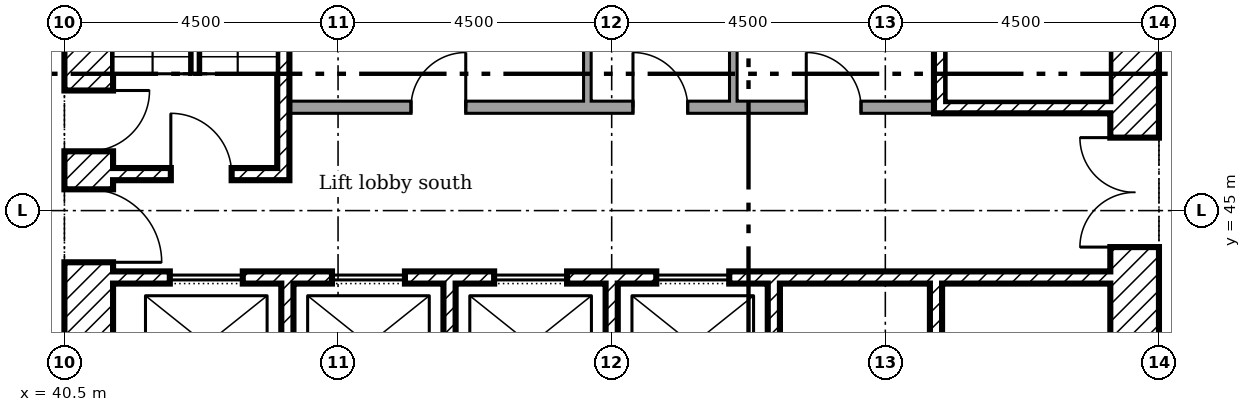
"""IFC4 building model, lengths in metres.
Left out: names, types, materials, properties, quantities, classifications, styles, units other than length and angle.
Written with IfcOpenShell. Run it as: python <this file> out.ifc"""

import sys

from ifc_helpers import new_model, si_unit, direction, frame, frame_2d, origin, place, context, subcontext, project, spatial, rectangle, extrude, element, fill, save


model = new_model("IFC4")
c1 = context("Model", 3, precision=1e-05, world=origin(), true_north=direction((0.0, 1.0)))
c2 = subcontext(c1, "Body", "Model", "MODEL_VIEW")
j1 = project(units=[si_unit("LENGTHUNIT", "METRE"), si_unit("PLANEANGLEUNIT", "RADIAN")], contexts=[c1])
p1 = place(None, origin())
s1 = spatial("IfcSite", under=j1, at=p1, CompositionType="ELEMENT")
p2 = place(p1, origin())
s2 = spatial("IfcBuilding", under=s1, at=p2, CompositionType="ELEMENT")
p3 = place(p2, frame((0.0, 0.0, 58.2)))
s3 = spatial("IfcBuildingStorey", under=s2, at=p3, CompositionType="ELEMENT", Elevation=58.2)
p4 = place(p3, frame((58.1, 40.5, 0.0), z_axis=(0.0, 0.0, 1.0), x_axis=(0.0, 1.0, 0.0)))
e1 = element("IfcWall", 1, at=p4, inside=s3, PredefinedType="SHEAR", context=c2, shape_type="SweptSolid", body=[
    extrude(rectangle(XDim=18.0, YDim=0.8, at=frame_2d((9.0, 0.0))), origin(), (0.0, 0.0, 1.0), 3.35),
])
p5 = place(p4, frame((13.15, 0.0, 0.0)))
e2 = element("IfcOpeningElement", 2, at=p5, cuts=e1, PredefinedType="OPENING", context=c2, shape_type="SweptSolid", body=[
    extrude(rectangle(XDim=1.2, YDim=2.1, at=frame_2d((0.6, 1.05))), frame((0.0, 0.41, 0.0), z_axis=(0.0, -1.0, 0.0), x_axis=(1.0, 0.0, 0.0)), (0.0, 0.0, 1.0), 0.82),
])
p6 = place(p4, frame((3.9, 0.0, 0.0)))
e3 = element("IfcOpeningElement", 3, at=p6, cuts=e1, PredefinedType="OPENING", context=c2, shape_type="SweptSolid", body=[
    extrude(rectangle(XDim=1.8, YDim=2.1, at=frame_2d((0.9, 1.05))), frame((0.0, 0.41, 0.0), z_axis=(0.0, -1.0, 0.0), x_axis=(1.0, 0.0, 0.0)), (0.0, 0.0, 1.0), 0.82),
])
p7 = place(p4, frame((11.525, 0.0, 0.0)))
e4 = element("IfcOpeningElement", 4, at=p7, cuts=e1, PredefinedType="OPENING", context=c2, shape_type="SweptSolid", body=[
    extrude(rectangle(XDim=1.0, YDim=2.1, at=frame_2d((0.5, 1.05))), frame((0.0, 0.41, 0.0), z_axis=(0.0, -1.0, 0.0), x_axis=(1.0, 0.0, 0.0)), (0.0, 0.0, 1.0), 0.82),
])
p8 = place(p3, frame((40.9, 40.5, 0.0), z_axis=(0.0, 0.0, 1.0), x_axis=(0.0, 1.0, 0.0)))
e5 = element("IfcWall", 5, at=p8, inside=s3, PredefinedType="SHEAR", context=c2, shape_type="SweptSolid", body=[
    extrude(rectangle(XDim=18.0, YDim=0.8, at=frame_2d((9.0, 0.0))), origin(), (0.0, 0.0, 1.0), 3.35),
])
p9 = place(p8, frame((3.65, 0.0, 0.0)))
e6 = element("IfcOpeningElement", 6, at=p9, cuts=e5, PredefinedType="OPENING", context=c2, shape_type="SweptSolid", body=[
    extrude(rectangle(XDim=1.2, YDim=2.1, at=frame_2d((0.6, 1.05))), frame((0.0, 0.41, 0.0), z_axis=(0.0, -1.0, 0.0), x_axis=(1.0, 0.0, 0.0)), (0.0, 0.0, 1.0), 0.82),
])
p10 = place(p8, frame((5.475, 0.0, 0.0)))
e7 = element("IfcOpeningElement", 7, at=p10, cuts=e5, PredefinedType="OPENING", context=c2, shape_type="SweptSolid", body=[
    extrude(rectangle(XDim=1.0, YDim=2.1, at=frame_2d((0.5, 1.05))), frame((0.0, 0.41, 0.0), z_axis=(0.0, -1.0, 0.0), x_axis=(1.0, 0.0, 0.0)), (0.0, 0.0, 1.0), 0.82),
])
p11 = place(p8, frame((12.3, 0.0, 0.0)))
e8 = element("IfcOpeningElement", 8, at=p11, cuts=e5, PredefinedType="OPENING", context=c2, shape_type="SweptSolid", body=[
    extrude(rectangle(XDim=1.0, YDim=2.1, at=frame_2d((0.5, 1.05))), frame((0.0, 0.41, 0.0), z_axis=(0.0, -1.0, 0.0), x_axis=(1.0, 0.0, 0.0)), (0.0, 0.0, 1.0), 0.82),
])
for number, where, z_axis, x_axis in (
    (9, (44.167, 41.3, 0.0), (0.0, 0.0, 1.0), (0.0, 1.0, 0.0)),
    (10, (46.833, 41.3, 0.0), (0.0, 0.0, 1.0), (0.0, 1.0, 0.0)),
    (11, (49.5, 41.3, 0.0), (0.0, 0.0, 1.0), (0.0, 1.0, 0.0)),
    (12, (52.167, 41.3, 0.0), (0.0, 0.0, 1.0), (0.0, 1.0, 0.0)),
    (13, (54.833, 41.3, 0.0), (0.0, 0.0, 1.0), (0.0, 1.0, 0.0)),
):
    element("IfcWall", number, at=place(p3, frame(where, z_axis=z_axis, x_axis=x_axis)), inside=s3, PredefinedType="SHEAR", context=c2, shape_type="SweptSolid", body=[
        extrude(rectangle(XDim=2.5, YDim=0.2, at=frame_2d((1.25, 0.0))), origin(), (0.0, 0.0, 1.0), 3.35),
    ])
p12 = place(p3, frame((41.3, 43.9, 0.0)))
e14 = element("IfcWall", 14, at=p12, inside=s3, PredefinedType="SHEAR", context=c2, shape_type="SweptSolid", body=[
    extrude(rectangle(XDim=16.4, YDim=0.2, at=frame_2d((8.2, 0.0))), origin(), (0.0, 0.0, 1.0), 3.35),
])
p13 = place(p12, frame((0.933, 0.0, 0.0)))
e15 = element("IfcOpeningElement", 15, at=p13, cuts=e14, PredefinedType="OPENING", context=c2, shape_type="SweptSolid", body=[
    extrude(rectangle(XDim=1.2, YDim=2.1, at=frame_2d((0.6, 1.05))), frame((0.0, 0.11, 0.0), z_axis=(0.0, -1.0, 0.0), x_axis=(1.0, 0.0, 0.0)), (0.0, 0.0, 1.0), 0.22),
])
p14 = place(p12, frame((3.6, 0.0, 0.0)))
e16 = element("IfcOpeningElement", 16, at=p14, cuts=e14, PredefinedType="OPENING", context=c2, shape_type="SweptSolid", body=[
    extrude(rectangle(XDim=1.2, YDim=2.1, at=frame_2d((0.6, 1.05))), frame((0.0, 0.11, 0.0), z_axis=(0.0, -1.0, 0.0), x_axis=(1.0, 0.0, 0.0)), (0.0, 0.0, 1.0), 0.22),
])
p15 = place(p12, frame((6.267, 0.0, 0.0)))
e17 = element("IfcOpeningElement", 17, at=p15, cuts=e14, PredefinedType="OPENING", context=c2, shape_type="SweptSolid", body=[
    extrude(rectangle(XDim=1.2, YDim=2.1, at=frame_2d((0.6, 1.05))), frame((0.0, 0.11, 0.0), z_axis=(0.0, -1.0, 0.0), x_axis=(1.0, 0.0, 0.0)), (0.0, 0.0, 1.0), 0.22),
])
p16 = place(p12, frame((8.933, 0.0, 0.0)))
e18 = element("IfcOpeningElement", 18, at=p16, cuts=e14, PredefinedType="OPENING", context=c2, shape_type="SweptSolid", body=[
    extrude(rectangle(XDim=1.2, YDim=2.1, at=frame_2d((0.6, 1.05))), frame((0.0, 0.11, 0.0), z_axis=(0.0, -1.0, 0.0), x_axis=(1.0, 0.0, 0.0)), (0.0, 0.0, 1.0), 0.22),
])
p17 = place(p3, frame((44.1, 45.5, 0.0), z_axis=(0.0, 0.0, 1.0), x_axis=(0.0, 1.0, 0.0)))
e19 = element("IfcWall", 19, at=p17, inside=s3, PredefinedType="SHEAR", context=c2, shape_type="SweptSolid", body=[
    extrude(rectangle(XDim=6.9, YDim=0.2, at=frame_2d((3.45, 0.0))), origin(), (0.0, 0.0, 1.0), 3.35),
])
p18 = place(p3, frame((41.3, 45.6, 0.0)))
e20 = element("IfcWall", 20, at=p18, inside=s3, PredefinedType="SHEAR", context=c2, shape_type="SweptSolid", body=[
    extrude(rectangle(XDim=2.7, YDim=0.2, at=frame_2d((1.35, 0.0))), origin(), (0.0, 0.0, 1.0), 3.35),
])
p19 = place(p18, frame((0.95, 0.0, 0.0)))
e21 = element("IfcOpeningElement", 21, at=p19, cuts=e20, PredefinedType="OPENING", context=c2, shape_type="SweptSolid", body=[
    extrude(rectangle(XDim=1.0, YDim=2.1, at=frame_2d((0.5, 1.05))), frame((0.0, 0.11, 0.0), z_axis=(0.0, -1.0, 0.0), x_axis=(1.0, 0.0, 0.0)), (0.0, 0.0, 1.0), 0.22),
])
p20 = place(p3, frame((54.8, 46.7, 0.0)))
e22 = element("IfcWall", 22, at=p20, inside=s3, PredefinedType="SHEAR", context=c2, shape_type="SweptSolid", body=[
    extrude(rectangle(XDim=2.9, YDim=0.2, at=frame_2d((1.45, 0.0))), origin(), (0.0, 0.0, 1.0), 3.35),
])
p21 = place(p3, frame((54.9, 46.8, 0.0), z_axis=(0.0, 0.0, 1.0), x_axis=(0.0, 1.0, 0.0)))
e23 = element("IfcWall", 23, at=p21, inside=s3, PredefinedType="SHEAR", context=c2, shape_type="SweptSolid", body=[
    extrude(rectangle(XDim=6.5, YDim=0.2, at=frame_2d((3.25, 0.0))), origin(), (0.0, 0.0, 1.0), 3.35),
])
p22 = place(p3, frame((44.2, 46.7, 0.0)))
e24 = element("IfcWall", 24, at=p22, inside=s3, PredefinedType="PARTITIONING", context=c2, shape_type="SweptSolid", body=[
    extrude(rectangle(XDim=10.6, YDim=0.2, at=frame_2d((5.3, 0.0))), origin(), (0.0, 0.0, 1.0), 3.35),
])
p23 = place(p22, frame((2.0, 0.0, 0.0)))
e25 = element("IfcOpeningElement", 25, at=p23, cuts=e24, PredefinedType="OPENING", context=c2, shape_type="SweptSolid", body=[
    extrude(rectangle(XDim=0.9, YDim=2.1, at=frame_2d((0.45, 1.05))), frame((0.0, 0.11, 0.0), z_axis=(0.0, -1.0, 0.0), x_axis=(1.0, 0.0, 0.0)), (0.0, 0.0, 1.0), 0.22),
])
p24 = place(p22, frame((5.65, 0.0, 0.0)))
e26 = element("IfcOpeningElement", 26, at=p24, cuts=e24, PredefinedType="OPENING", context=c2, shape_type="SweptSolid", body=[
    extrude(rectangle(XDim=0.9, YDim=2.1, at=frame_2d((0.45, 1.05))), frame((0.0, 0.11, 0.0), z_axis=(0.0, -1.0, 0.0), x_axis=(1.0, 0.0, 0.0)), (0.0, 0.0, 1.0), 0.22),
])
p25 = place(p22, frame((8.5, 0.0, 0.0)))
e27 = element("IfcOpeningElement", 27, at=p25, cuts=e24, PredefinedType="OPENING", context=c2, shape_type="SweptSolid", body=[
    extrude(rectangle(XDim=0.9, YDim=2.1, at=frame_2d((0.45, 1.05))), frame((0.0, 0.11, 0.0), z_axis=(0.0, -1.0, 0.0), x_axis=(1.0, 0.0, 0.0)), (0.0, 0.0, 1.0), 0.22),
])
p26 = place(p3, frame((49.1, 46.8, 0.0), z_axis=(0.0, 0.0, 1.0), x_axis=(0.0, 1.0, 0.0)))
e28 = element("IfcWall", 28, at=p26, inside=s3, PredefinedType="PARTITIONING", context=c2, shape_type="SweptSolid", body=[
    extrude(rectangle(XDim=5.0, YDim=0.125, at=frame_2d((2.5, 0.0))), origin(), (0.0, 0.0, 1.0), 3.35),
])
p27 = place(p3, frame((51.5, 46.8, 0.0), z_axis=(0.0, 0.0, 1.0), x_axis=(0.0, 1.0, 0.0)))
e29 = element("IfcWall", 29, at=p27, inside=s3, PredefinedType="PARTITIONING", context=c2, shape_type="SweptSolid", body=[
    extrude(rectangle(XDim=2.762, YDim=0.125, at=frame_2d((1.381, 0.0))), origin(), (0.0, 0.0, 1.0), 3.35),
])
p28 = place(p6, origin())
e30 = element("IfcDoor", 30, at=p28, inside=s3, OperationType="DOUBLE_DOOR_SINGLE_SWING", PredefinedType="DOOR", context=c2, shape_type="SweptSolid", body=[
    extrude(rectangle(XDim=1.8, YDim=2.1, at=frame_2d((0.9, 1.05))), frame((0.0, 0.025, 0.0), z_axis=(0.0, -1.0, 0.0), x_axis=(1.0, 0.0, 0.0)), (0.0, 0.0, 1.0), 0.05),
])
fill(e3, e30)
p29 = place(p9, frame((1.2, 0.0, 0.0), x_axis=(-1.0, 0.0, 0.0)))
e31 = element("IfcDoor", 31, at=p29, inside=s3, OperationType="SINGLE_SWING_LEFT", PredefinedType="DOOR", context=c2, shape_type="SweptSolid", body=[
    extrude(rectangle(XDim=1.2, YDim=2.1, at=frame_2d((0.6, 1.05))), frame((0.0, 0.025, 0.0), z_axis=(0.0, -1.0, 0.0), x_axis=(1.0, 0.0, 0.0)), (0.0, 0.0, 1.0), 0.05),
])
fill(e6, e31)
p30 = place(p19, origin())
e32 = element("IfcDoor", 32, at=p30, inside=s3, OperationType="SINGLE_SWING_RIGHT", PredefinedType="DOOR", context=c2, shape_type="SweptSolid", body=[
    extrude(rectangle(XDim=1.0, YDim=2.1, at=frame_2d((0.5, 1.05))), frame((0.0, 0.025, 0.0), z_axis=(0.0, -1.0, 0.0), x_axis=(1.0, 0.0, 0.0)), (0.0, 0.0, 1.0), 0.05),
])
fill(e21, e32)
p31 = place(p10, frame((1.0, 0.0, 0.0), x_axis=(-1.0, 0.0, 0.0)))
e33 = element("IfcDoor", 33, at=p31, inside=s3, OperationType="SINGLE_SWING_RIGHT", PredefinedType="DOOR", context=c2, shape_type="SweptSolid", body=[
    extrude(rectangle(XDim=1.0, YDim=2.1, at=frame_2d((0.5, 1.05))), frame((0.0, 0.025, 0.0), z_axis=(0.0, -1.0, 0.0), x_axis=(1.0, 0.0, 0.0)), (0.0, 0.0, 1.0), 0.05),
])
fill(e7, e33)
p32 = place(p23, origin())
e34 = element("IfcDoor", 34, at=p32, inside=s3, OperationType="SINGLE_SWING_LEFT", PredefinedType="DOOR", context=c2, shape_type="SweptSolid", body=[
    extrude(rectangle(XDim=0.9, YDim=2.1, at=frame_2d((0.45, 1.05))), frame((0.0, 0.025, 0.0), z_axis=(0.0, -1.0, 0.0), x_axis=(1.0, 0.0, 0.0)), (0.0, 0.0, 1.0), 0.05),
])
fill(e25, e34)
p33 = place(p24, origin())
e35 = element("IfcDoor", 35, at=p33, inside=s3, OperationType="SINGLE_SWING_RIGHT", PredefinedType="DOOR", context=c2, shape_type="SweptSolid", body=[
    extrude(rectangle(XDim=0.9, YDim=2.1, at=frame_2d((0.45, 1.05))), frame((0.0, 0.025, 0.0), z_axis=(0.0, -1.0, 0.0), x_axis=(1.0, 0.0, 0.0)), (0.0, 0.0, 1.0), 0.05),
])
fill(e26, e35)
p34 = place(p25, origin())
e36 = element("IfcDoor", 36, at=p34, inside=s3, OperationType="SINGLE_SWING_RIGHT", PredefinedType="DOOR", context=c2, shape_type="SweptSolid", body=[
    extrude(rectangle(XDim=0.9, YDim=2.1, at=frame_2d((0.45, 1.05))), frame((0.0, 0.025, 0.0), z_axis=(0.0, -1.0, 0.0), x_axis=(1.0, 0.0, 0.0)), (0.0, 0.0, 1.0), 0.05),
])
fill(e27, e36)
p35 = place(p13, origin())
e37 = element("IfcDoor", 37, at=p35, inside=s3, OperationType="SLIDING_TO_LEFT", PredefinedType="DOOR", context=c2, shape_type="SweptSolid", body=[
    extrude(rectangle(XDim=1.2, YDim=2.1, at=frame_2d((0.6, 1.05))), frame((0.0, 0.025, 0.0), z_axis=(0.0, -1.0, 0.0), x_axis=(1.0, 0.0, 0.0)), (0.0, 0.0, 1.0), 0.05),
])
fill(e15, e37)
p36 = place(p14, origin())
e38 = element("IfcDoor", 38, at=p36, inside=s3, OperationType="SLIDING_TO_LEFT", PredefinedType="DOOR", context=c2, shape_type="SweptSolid", body=[
    extrude(rectangle(XDim=1.2, YDim=2.1, at=frame_2d((0.6, 1.05))), frame((0.0, 0.025, 0.0), z_axis=(0.0, -1.0, 0.0), x_axis=(1.0, 0.0, 0.0)), (0.0, 0.0, 1.0), 0.05),
])
fill(e16, e38)
p37 = place(p15, origin())
e39 = element("IfcDoor", 39, at=p37, inside=s3, OperationType="SLIDING_TO_LEFT", PredefinedType="DOOR", context=c2, shape_type="SweptSolid", body=[
    extrude(rectangle(XDim=1.2, YDim=2.1, at=frame_2d((0.6, 1.05))), frame((0.0, 0.025, 0.0), z_axis=(0.0, -1.0, 0.0), x_axis=(1.0, 0.0, 0.0)), (0.0, 0.0, 1.0), 0.05),
])
fill(e17, e39)
p38 = place(p16, origin())
e40 = element("IfcDoor", 40, at=p38, inside=s3, OperationType="SLIDING_TO_LEFT", PredefinedType="DOOR", context=c2, shape_type="SweptSolid", body=[
    extrude(rectangle(XDim=1.2, YDim=2.1, at=frame_2d((0.6, 1.05))), frame((0.0, 0.025, 0.0), z_axis=(0.0, -1.0, 0.0), x_axis=(1.0, 0.0, 0.0)), (0.0, 0.0, 1.0), 0.05),
])
fill(e18, e40)
save(model, sys.argv[1])
